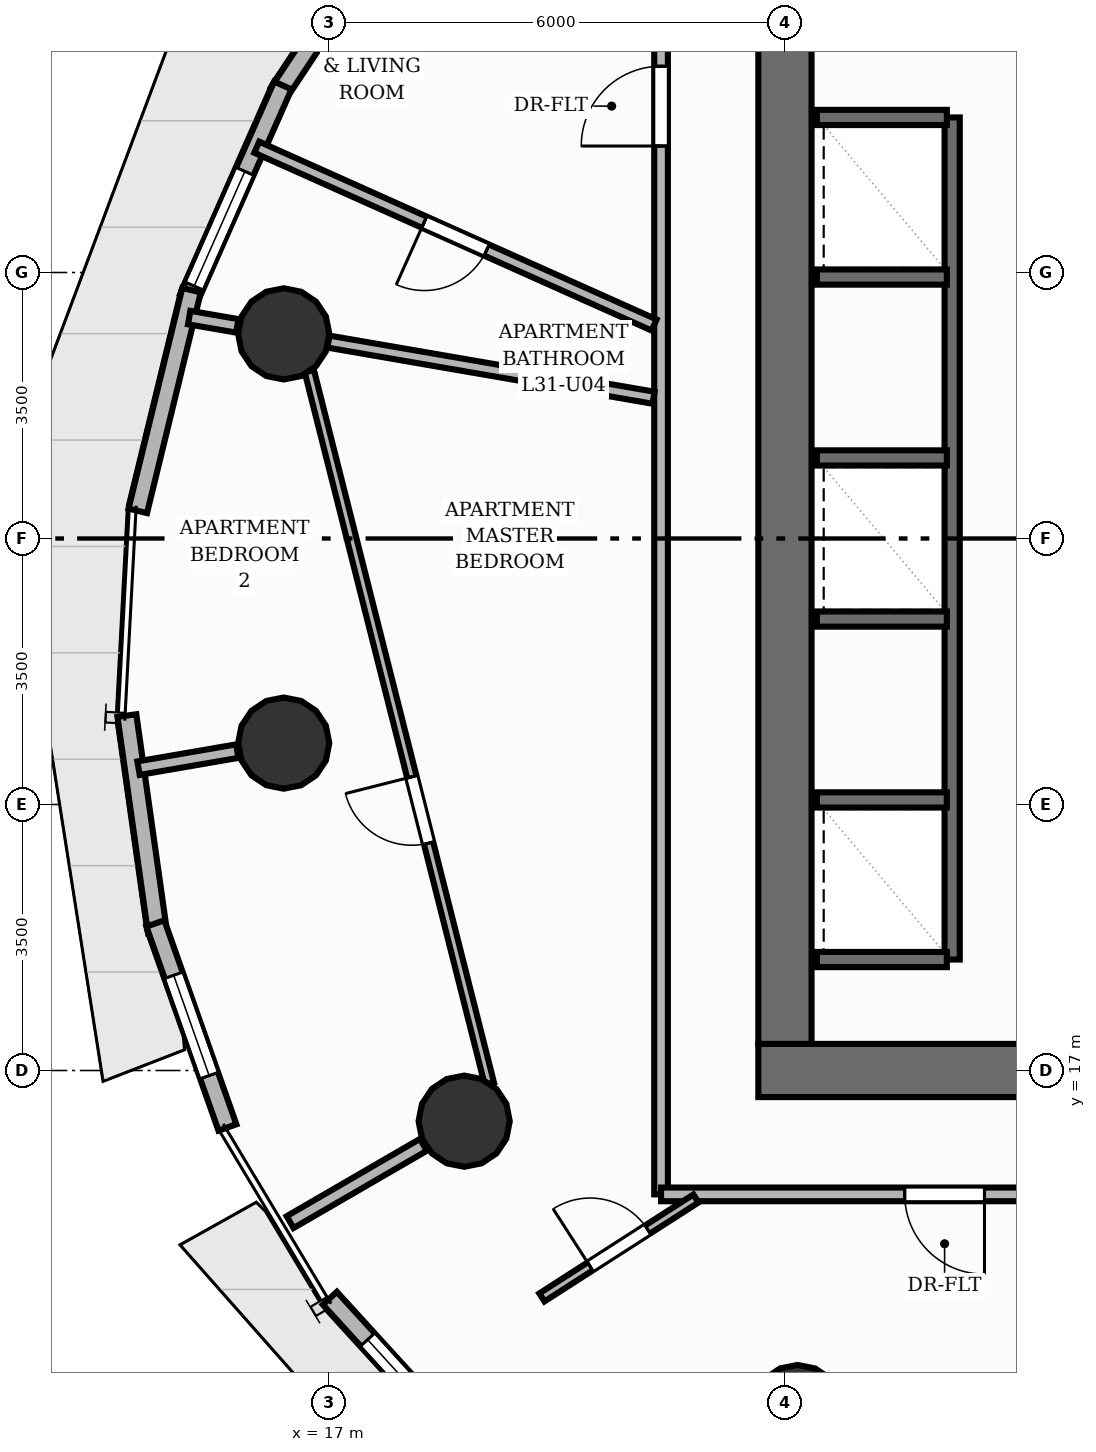
"""IFC4 building model, lengths in metres.
Left out: names, types, materials, properties, quantities, classifications, styles, units other than length and angle.
Written with IfcOpenShell. Run it as: python <this file> out.ifc"""

import sys

from ifc_helpers import new_model, si_unit, direction, frame, frame_2d, origin, origin_2d, place, context, subcontext, project, spatial, rectangle, circle, extrude, element, fill, save


model = new_model("IFC4")
c1 = context("Model", 3, precision=1e-05, world=origin(), true_north=direction((0.0, 1.0)))
c2 = subcontext(c1, "Body", "Model", "MODEL_VIEW")
j1 = project(units=[si_unit("LENGTHUNIT", "METRE"), si_unit("PLANEANGLEUNIT", "RADIAN")], contexts=[c1])
p1 = place(None, origin())
s1 = spatial("IfcSite", under=j1, at=p1, CompositionType="ELEMENT")
p2 = place(p1, origin())
s2 = spatial("IfcBuilding", under=s1, at=p2, CompositionType="ELEMENT")
p3 = place(p2, frame((0.0, 0.0, 106.08)))
s3 = spatial("IfcBuildingStorey", under=s2, at=p3, CompositionType="ELEMENT", Elevation=106.08)
p4 = place(p3, frame((22.65, 17.0, 0.0), z_axis=(0.0, 0.0, 1.0), x_axis=(1.0, 0.0, 0.0)))
e1 = element("IfcWall", 1, at=p4, inside=s3, PredefinedType="SHEAR", context=c2, shape_type="SweptSolid", body=[
    extrude(rectangle(XDim=18.7, YDim=0.7, at=frame_2d((9.35, 0.0))), origin(), (0.0, 0.0, 1.0), 3.2),
])
p5 = place(p4, frame((5.85, 0.0, 0.0)))
e2 = element("IfcOpeningElement", 2, at=p5, cuts=e1, PredefinedType="OPENING", context=c2, shape_type="SweptSolid", body=[
    extrude(rectangle(XDim=1.1, YDim=2.15, at=frame_2d((0.55, 1.075))), frame((0.0, 0.36, 0.0), z_axis=(0.0, -1.0, 0.0), x_axis=(1.0, 0.0, 0.0)), (0.0, 0.0, 1.0), 0.72),
])
p6 = place(p4, frame((9.4, 0.0, 0.0)))
e3 = element("IfcOpeningElement", 3, at=p6, cuts=e1, PredefinedType="OPENING", context=c2, shape_type="SweptSolid", body=[
    extrude(rectangle(XDim=0.9, YDim=2.1, at=frame_2d((0.45, 1.05))), frame((0.0, 0.36, 0.0), z_axis=(0.0, -1.0, 0.0), x_axis=(1.0, 0.0, 0.0)), (0.0, 0.0, 1.0), 0.72),
])
p7 = place(p3, frame((23.0, 17.35, 0.0), z_axis=(0.0, 0.0, 1.0), x_axis=(0.0, 1.0, 0.0)))
e4 = element("IfcWall", 4, at=p7, inside=s3, PredefinedType="SHEAR", context=c2, shape_type="SweptSolid", body=[
    extrude(rectangle(XDim=13.3, YDim=0.7, at=frame_2d((6.65, 0.0))), origin(), (0.0, 0.0, 1.0), 3.2),
])
for number, where, z_axis, x_axis in (
    (5, (16.406, 26.692, 0.0), (0.0, 0.0, 1.0), (1.0, 0.0, 0.0)),
    (6, (16.406, 21.308, 0.0), (0.0, 0.0, 1.0), (1.0, 0.0, 0.0)),
    (7, (18.78, 16.333, 0.0), (0.0, 0.0, 1.0), (1.0, 0.0, 0.0)),
    (8, (23.167, 12.526, 0.0), (0.0, 0.0, 1.0), (1.0, 0.0, 0.0)),
):
    element("IfcColumn", number, at=place(p3, frame(where, z_axis=z_axis, x_axis=x_axis)), inside=s3, PredefinedType="COLUMN", context=c2, shape_type="SweptSolid", body=[
        extrude(circle(Radius=0.6, at=origin_2d()), origin(), (0.0, 0.0, 1.0), 3.2),
    ])
p8 = place(p3, frame((16.341, 29.864, 0.0), z_axis=(0.0, 0.0, 1.0), x_axis=(0.552034347266, 0.833821371421, 0.0)))
e9 = element("IfcWall", 9, at=p8, inside=s3, PredefinedType="SOLIDWALL", context=c2, shape_type="SweptSolid", body=[
    extrude(rectangle(XDim=3.131, YDim=0.25, at=frame_2d((1.565, 0.0))), origin(), (0.0, 0.0, 1.0), 2.96),
])
p9 = place(p3, frame((15.157, 27.162, 0.0), z_axis=(0.0, 0.0, 1.0), x_axis=(0.404109525311, 0.914710605357, 0.0)))
e10 = element("IfcWall", 10, at=p9, inside=s3, PredefinedType="SOLIDWALL", context=c2, shape_type="SweptSolid", body=[
    extrude(rectangle(XDim=3.061, YDim=0.25, at=frame_2d((1.53, 0.0))), origin(), (0.0, 0.0, 1.0), 2.96),
])
p10 = place(p9, frame((0.175, 0.0, 0.85)))
e11 = element("IfcOpeningElement", 11, at=p10, cuts=e10, PredefinedType="OPENING", context=c2, shape_type="SweptSolid", body=[
    extrude(rectangle(XDim=1.65, YDim=1.55, at=frame_2d((0.825, 0.775))), frame((0.0, 0.135, 0.0), z_axis=(0.0, -1.0, 0.0), x_axis=(1.0, 0.0, 0.0)), (0.0, 0.0, 1.0), 0.27),
])
p11 = place(p3, frame((14.486, 24.364, 0.0), z_axis=(0.0, 0.0, 1.0), x_axis=(0.236668427837, 0.971590477138, 0.0)))
e12 = element("IfcWall", 12, at=p11, inside=s3, PredefinedType="SOLIDWALL", context=c2, shape_type="SweptSolid", body=[
    extrude(rectangle(XDim=2.989, YDim=0.25, at=frame_2d((1.494, 0.0))), origin(), (0.0, 0.0, 1.0), 2.96),
])
p12 = place(p3, frame((14.744, 18.824, 0.0), z_axis=(0.0, 0.0, 1.0), x_axis=(-0.139982311006, 0.990154004489, 0.0)))
e13 = element("IfcWall", 13, at=p12, inside=s3, PredefinedType="SOLIDWALL", context=c2, shape_type="SweptSolid", body=[
    extrude(rectangle(XDim=2.874, YDim=0.25, at=frame_2d((1.437, 0.0))), origin(), (0.0, 0.0, 1.0), 2.96),
])
p13 = place(p3, frame((15.665, 16.25, 0.0), z_axis=(0.0, 0.0, 1.0), x_axis=(-0.332923265962, 0.942953921982, 0.0)))
e14 = element("IfcWall", 14, at=p13, inside=s3, PredefinedType="SOLIDWALL", context=c2, shape_type="SweptSolid", body=[
    extrude(rectangle(XDim=2.847, YDim=0.25, at=frame_2d((1.424, 0.0))), origin(), (0.0, 0.0, 1.0), 2.96),
])
p14 = place(p13, frame((0.724, 0.0, 0.85)))
e15 = element("IfcOpeningElement", 15, at=p14, cuts=e14, PredefinedType="OPENING", context=c2, shape_type="SweptSolid", body=[
    extrude(rectangle(XDim=1.4, YDim=1.55, at=frame_2d((0.7, 0.775))), frame((0.0, 0.135, 0.0), z_axis=(0.0, -1.0, 0.0), x_axis=(1.0, 0.0, 0.0)), (0.0, 0.0, 1.0), 0.27),
])
p15 = place(p3, frame((18.949, 11.879, 0.0), z_axis=(0.0, 0.0, 1.0), x_axis=(-0.673691100196, 0.739013059098, 0.0)))
e16 = element("IfcWall", 16, at=p15, inside=s3, PredefinedType="SOLIDWALL", context=c2, shape_type="SweptSolid", body=[
    extrude(rectangle(XDim=2.874, YDim=0.25, at=frame_2d((1.437, 0.0))), origin(), (0.0, 0.0, 1.0), 2.96),
])
p16 = place(p15, frame((0.737, 0.0, 0.85)))
e17 = element("IfcOpeningElement", 17, at=p16, cuts=e16, PredefinedType="OPENING", context=c2, shape_type="SweptSolid", body=[
    extrude(rectangle(XDim=1.4, YDim=1.55, at=frame_2d((0.7, 0.775))), frame((0.0, 0.135, 0.0), z_axis=(0.0, -1.0, 0.0), x_axis=(1.0, 0.0, 0.0)), (0.0, 0.0, 1.0), 0.27),
])
p17 = place(p3, frame((25.2, 18.46, 0.0), z_axis=(0.0, 0.0, 1.0), x_axis=(0.0, 1.0, 0.0)))
e18 = element("IfcWall", 18, at=p17, inside=s3, PredefinedType="SHEAR", context=c2, shape_type="SweptSolid", body=[
    extrude(rectangle(XDim=11.08, YDim=0.2, at=frame_2d((5.54, 0.0))), origin(), (0.0, 0.0, 1.0), 3.2),
])
for number, where, z_axis, x_axis in (
    (19, (23.42, 18.46, 0.0), (0.0, 0.0, 1.0), (1.0, 0.0, 0.0)),
    (20, (23.42, 29.54, 0.0), (0.0, 0.0, 1.0), (1.0, 0.0, 0.0)),
    (21, (23.42, 20.56, 0.0), (0.0, 0.0, 1.0), (1.0, 0.0, 0.0)),
    (22, (23.42, 22.94, 0.0), (0.0, 0.0, 1.0), (1.0, 0.0, 0.0)),
    (23, (23.42, 25.06, 0.0), (0.0, 0.0, 1.0), (1.0, 0.0, 0.0)),
    (24, (23.42, 27.44, 0.0), (0.0, 0.0, 1.0), (1.0, 0.0, 0.0)),
):
    element("IfcWall", number, at=place(p3, frame(where, z_axis=z_axis, x_axis=x_axis)), inside=s3, PredefinedType="SHEAR", context=c2, shape_type="SweptSolid", body=[
        extrude(rectangle(XDim=1.71, YDim=0.2, at=frame_2d((0.855, 0.0))), origin(), (0.0, 0.0, 1.0), 3.2),
    ])
p18 = place(p3, frame((15.794, 26.798, 0.0), z_axis=(0.0, 0.0, 1.0), x_axis=(-0.985389793052, 0.170314285219, 0.0)))
e25 = element("IfcWall", 25, at=p18, inside=s3, PredefinedType="PARTITIONING", context=c2, shape_type="SweptSolid", body=[
    extrude(rectangle(XDim=0.642, YDim=0.18, at=frame_2d((0.321, 0.0))), origin(), (0.0, 0.0, 1.0), 2.26),
])
p19 = place(p3, frame((15.794, 21.202, 0.0), z_axis=(0.0, 0.0, 1.0), x_axis=(-0.98541625201, -0.170161130326, 0.0)))
e26 = element("IfcWall", 26, at=p19, inside=s3, PredefinedType="PARTITIONING", context=c2, shape_type="SweptSolid", body=[
    extrude(rectangle(XDim=1.319, YDim=0.18, at=frame_2d((0.659, 0.0))), origin(), (0.0, 0.0, 1.0), 2.26),
])
p20 = place(p3, frame((18.243, 16.022, 0.0), z_axis=(0.0, 0.0, 1.0), x_axis=(-0.865046864493, -0.501691062539, 0.0)))
e27 = element("IfcWall", 27, at=p20, inside=s3, PredefinedType="PARTITIONING", context=c2, shape_type="SweptSolid", body=[
    extrude(rectangle(XDim=2.028, YDim=0.18, at=frame_2d((1.014, 0.0))), origin(), (0.0, 0.0, 1.0), 2.26),
])
p21 = place(p3, frame((21.37, 15.37, 0.0), z_axis=(0.0, 0.0, 1.0), x_axis=(0.0, 1.0, 0.0)))
e28 = element("IfcWall", 28, at=p21, inside=s3, PredefinedType="PARTITIONING", context=c2, shape_type="SweptSolid", body=[
    extrude(rectangle(XDim=17.26, YDim=0.18, at=frame_2d((8.63, 0.0))), origin(), (0.0, 0.0, 1.0), 2.955),
])
p22 = place(p21, frame((13.794, 0.0, 0.0)))
e29 = element("IfcOpeningElement", 29, at=p22, cuts=e28, PredefinedType="OPENING", context=c2, shape_type="SweptSolid", body=[
    extrude(rectangle(XDim=1.05, YDim=2.15, at=frame_2d((0.525, 1.075))), frame((0.0, 0.1, 0.0), z_axis=(0.0, -1.0, 0.0), x_axis=(1.0, 0.0, 0.0)), (0.0, 0.0, 1.0), 0.2),
])
p23 = place(p3, frame((28.325, 15.37, 0.0), z_axis=(0.0, 0.0, 1.0), x_axis=(-1.0, 0.0, 0.0)))
e30 = element("IfcWall", 30, at=p23, inside=s3, PredefinedType="PARTITIONING", context=c2, shape_type="SweptSolid", body=[
    extrude(rectangle(XDim=6.955, YDim=0.18, at=frame_2d((3.478, 0.0))), origin(), (0.0, 0.0, 1.0), 2.955),
])
p24 = place(p23, frame((2.7, 0.0, 0.0)))
e31 = element("IfcOpeningElement", 31, at=p24, cuts=e30, PredefinedType="OPENING", context=c2, shape_type="SweptSolid", body=[
    extrude(rectangle(XDim=1.05, YDim=2.15, at=frame_2d((0.525, 1.075))), frame((0.0, 0.1, 0.0), z_axis=(0.0, -1.0, 0.0), x_axis=(1.0, 0.0, 0.0)), (0.0, 0.0, 1.0), 0.2),
])
p25 = place(p3, frame((21.279, 26.809, 0.0), z_axis=(0.0, 0.0, 1.0), x_axis=(-0.912794415037, 0.408419338275, 0.0)))
e32 = element("IfcWall", 32, at=p25, inside=s3, PredefinedType="PLUMBINGWALL", context=c2, shape_type="SweptSolid", body=[
    extrude(rectangle(XDim=5.727, YDim=0.16, at=frame_2d((2.864, 0.0))), origin(), (0.0, 0.0, 1.0), 2.641),
])
p26 = place(p25, frame((2.414, 0.0, 0.0)))
e33 = element("IfcOpeningElement", 33, at=p26, cuts=e32, PredefinedType="OPENING", context=c2, shape_type="SweptSolid", body=[
    extrude(rectangle(XDim=0.9, YDim=2.1, at=frame_2d((0.45, 1.05))), frame((0.0, 0.09, 0.0), z_axis=(0.0, -1.0, 0.0), x_axis=(1.0, 0.0, 0.0)), (0.0, 0.0, 1.0), 0.18),
])
p27 = place(p3, frame((21.271, 25.852, 0.0), z_axis=(0.0, 0.0, 1.0), x_axis=(-0.985414949705, 0.170168671906, 0.0)))
e34 = element("IfcWall", 34, at=p27, inside=s3, PredefinedType="PLUMBINGWALL", context=c2, shape_type="SweptSolid", body=[
    extrude(rectangle(XDim=4.341, YDim=0.16, at=frame_2d((2.171, 0.0))), origin(), (0.0, 0.0, 1.0), 2.26),
])
p28 = place(p3, frame((19.802, 14.014, 0.0), z_axis=(0.0, 0.0, 1.0), x_axis=(0.841349696578, 0.540491154477, 0.0)))
e35 = element("IfcWall", 35, at=p28, inside=s3, PredefinedType="PARTITIONING", context=c2, shape_type="SweptSolid", body=[
    extrude(rectangle(XDim=2.408, YDim=0.125, at=frame_2d((1.204, 0.0))), origin(), (0.0, 0.0, 1.0), 2.955),
])
p29 = place(p28, frame((0.754, 0.0, 0.0)))
e36 = element("IfcOpeningElement", 36, at=p29, cuts=e35, PredefinedType="OPENING", context=c2, shape_type="SweptSolid", body=[
    extrude(rectangle(XDim=0.9, YDim=2.1, at=frame_2d((0.45, 1.05))), frame((0.0, 0.073, 0.0), z_axis=(0.0, -1.0, 0.0), x_axis=(1.0, 0.0, 0.0)), (0.0, 0.0, 1.0), 0.145),
])
p30 = place(p3, frame((19.111, 16.826, 0.0), z_axis=(0.0, 0.0, 1.0), x_axis=(-0.244982180272, 0.969527581531, 0.0)))
e37 = element("IfcWall", 37, at=p30, inside=s3, PredefinedType="PARTITIONING", context=c2, shape_type="SweptSolid", body=[
    extrude(rectangle(XDim=9.671, YDim=0.125, at=frame_2d((4.835, 0.0))), origin(), (0.0, 0.0, 1.0), 2.955),
])
p31 = place(p30, frame((3.265, 0.0, 0.0)))
e38 = element("IfcOpeningElement", 38, at=p31, cuts=e37, PredefinedType="OPENING", context=c2, shape_type="SweptSolid", body=[
    extrude(rectangle(XDim=0.9, YDim=2.1, at=frame_2d((0.45, 1.05))), frame((0.0, 0.073, 0.0), z_axis=(0.0, -1.0, 0.0), x_axis=(1.0, 0.0, 0.0)), (0.0, 0.0, 1.0), 0.145),
])
p32 = place(p10, origin())
e39 = element("IfcWindow", 39, at=p32, inside=s3, PartitioningType="SINGLE_PANEL", PredefinedType="WINDOW", context=c2, shape_type="SweptSolid", body=[
    extrude(rectangle(XDim=1.65, YDim=1.55, at=frame_2d((0.825, 0.775))), frame((0.0, 0.03, 0.0), z_axis=(0.0, -1.0, 0.0), x_axis=(1.0, 0.0, 0.0)), (0.0, 0.0, 1.0), 0.06),
])
fill(e11, e39)
p33 = place(p14, origin())
e40 = element("IfcWindow", 40, at=p33, inside=s3, PartitioningType="SINGLE_PANEL", PredefinedType="WINDOW", context=c2, shape_type="SweptSolid", body=[
    extrude(rectangle(XDim=1.4, YDim=1.55, at=frame_2d((0.7, 0.775))), frame((0.0, 0.03, 0.0), z_axis=(0.0, -1.0, 0.0), x_axis=(1.0, 0.0, 0.0)), (0.0, 0.0, 1.0), 0.06),
])
fill(e15, e40)
p34 = place(p16, origin())
e41 = element("IfcWindow", 41, at=p34, inside=s3, PartitioningType="SINGLE_PANEL", PredefinedType="WINDOW", context=c2, shape_type="SweptSolid", body=[
    extrude(rectangle(XDim=1.4, YDim=1.55, at=frame_2d((0.7, 0.775))), frame((0.0, 0.03, 0.0), z_axis=(0.0, -1.0, 0.0), x_axis=(1.0, 0.0, 0.0)), (0.0, 0.0, 1.0), 0.06),
])
fill(e17, e41)
p35 = place(p22, origin())
e42 = element("IfcDoor", 42, at=p35, inside=s3, OperationType="SINGLE_SWING_LEFT", PredefinedType="DOOR", context=c2, shape_type="SweptSolid", body=[
    extrude(rectangle(XDim=1.05, YDim=2.15, at=frame_2d((0.525, 1.075))), frame((0.0, 0.025, 0.0), z_axis=(0.0, -1.0, 0.0), x_axis=(1.0, 0.0, 0.0)), (0.0, 0.0, 1.0), 0.05),
])
fill(e29, e42)
p36 = place(p26, origin())
e43 = element("IfcDoor", 43, at=p36, inside=s3, OperationType="SINGLE_SWING_RIGHT", PredefinedType="DOOR", context=c2, shape_type="SweptSolid", body=[
    extrude(rectangle(XDim=0.9, YDim=2.1, at=frame_2d((0.45, 1.05))), frame((0.0, 0.025, 0.0), z_axis=(0.0, -1.0, 0.0), x_axis=(1.0, 0.0, 0.0)), (0.0, 0.0, 1.0), 0.05),
])
fill(e33, e43)
p37 = place(p24, origin())
e44 = element("IfcDoor", 44, at=p37, inside=s3, OperationType="SINGLE_SWING_LEFT", PredefinedType="DOOR", context=c2, shape_type="SweptSolid", body=[
    extrude(rectangle(XDim=1.05, YDim=2.15, at=frame_2d((0.525, 1.075))), frame((0.0, 0.025, 0.0), z_axis=(0.0, -1.0, 0.0), x_axis=(1.0, 0.0, 0.0)), (0.0, 0.0, 1.0), 0.05),
])
fill(e31, e44)
p38 = place(p29, origin())
e45 = element("IfcDoor", 45, at=p38, inside=s3, OperationType="SINGLE_SWING_LEFT", PredefinedType="DOOR", context=c2, shape_type="SweptSolid", body=[
    extrude(rectangle(XDim=0.9, YDim=2.1, at=frame_2d((0.45, 1.05))), frame((0.0, 0.025, 0.0), z_axis=(0.0, -1.0, 0.0), x_axis=(1.0, 0.0, 0.0)), (0.0, 0.0, 1.0), 0.05),
])
fill(e36, e45)
p39 = place(p31, origin())
e46 = element("IfcDoor", 46, at=p39, inside=s3, OperationType="SINGLE_SWING_RIGHT", PredefinedType="DOOR", context=c2, shape_type="SweptSolid", body=[
    extrude(rectangle(XDim=0.9, YDim=2.1, at=frame_2d((0.45, 1.05))), frame((0.0, 0.025, 0.0), z_axis=(0.0, -1.0, 0.0), x_axis=(1.0, 0.0, 0.0)), (0.0, 0.0, 1.0), 0.05),
])
fill(e38, e46)
save(model, sys.argv[1])
